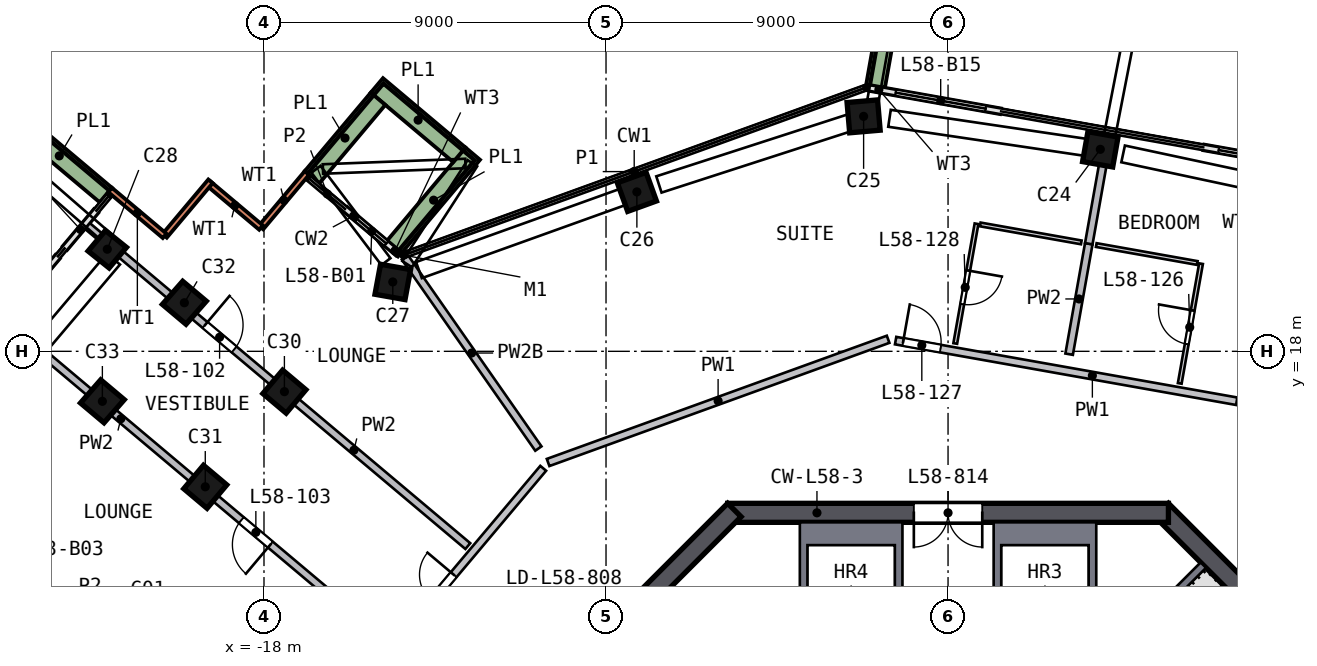
"""IFC4 building model, lengths in metres.
Left out: names, types, materials, properties, quantities, classifications, styles, units other than length and angle.
Written with IfcOpenShell. Run it as: python <this file> out.ifc"""

import sys

from ifc_helpers import new_model, si_unit, direction, frame, frame_2d, origin, origin_2d, place, context, subcontext, project, spatial, polyline, rectangle, outline, extrude, element, fill, save


model = new_model("IFC4")
c1 = context("Model", 3, precision=1e-05, world=origin(), true_north=direction((0.0, 1.0)))
c2 = subcontext(c1, "Body", "Model", "MODEL_VIEW")
j1 = project(units=[si_unit("LENGTHUNIT", "METRE"), si_unit("PLANEANGLEUNIT", "RADIAN")], contexts=[c1])
p1 = place(None, origin())
s1 = spatial("IfcSite", under=j1, at=p1, CompositionType="ELEMENT")
p2 = place(p1, origin())
s2 = spatial("IfcBuilding", under=s1, at=p2, CompositionType="ELEMENT")
p3 = place(p2, frame((0.0, 0.0, 237.5)))
s3 = spatial("IfcBuildingStorey", under=s2, at=p3, CompositionType="ELEMENT", Elevation=237.5)
p4 = place(p3, frame((4.141, 23.293, 0.0), z_axis=(-0.111029677, 0.018783788, 0.993639562), x_axis=(-0.978276827, 0.174054393, -0.112603368)))
e1 = element("IfcColumn", 1, at=p4, inside=s3, PredefinedType="COLUMN", context=c2, shape_type="SweptSolid", body=[
    extrude(rectangle(XDim=0.8, YDim=0.8, at=origin_2d()), origin(), (0.0, 0.0, 1.0), 3.21),
])
p5 = place(p3, frame((-2.083, 24.196, 0.0), z_axis=(-0.114946373, -0.010795228, 0.993313039), x_axis=(0.98971463, 0.084478949, 0.115448074)))
e2 = element("IfcColumn", 2, at=p5, inside=s3, PredefinedType="COLUMN", context=c2, shape_type="SweptSolid", body=[
    extrude(rectangle(XDim=0.8, YDim=0.8, at=origin_2d()), origin(), (0.0, 0.0, 1.0), 3.211),
])
p6 = place(p3, frame((-8.061, 22.243, 0.0), z_axis=(-0.105478981, -0.039240919, 0.993646987), x_axis=(-0.93419489, -0.338548583, -0.112537837)))
e3 = element("IfcColumn", 3, at=p6, inside=s3, PredefinedType="COLUMN", context=c2, shape_type="SweptSolid", body=[
    extrude(rectangle(XDim=0.8, YDim=0.8, at=origin_2d()), origin(), (0.0, 0.0, 1.0), 3.21),
])
p7 = place(p3, frame((-14.497, 19.91, 0.0), z_axis=(-0.094097867, -0.069699308, 0.993120133), x_axis=(0.980134973, -0.18142167, 0.080134963)))
e4 = element("IfcColumn", 4, at=p7, inside=s3, PredefinedType="COLUMN", context=c2, shape_type="SweptSolid", body=[
    extrude(rectangle(XDim=0.8, YDim=0.8, at=origin_2d()), origin(), (0.0, 0.0, 1.0), 3.212),
])
p8 = place(p3, frame((-21.863, 20.698, 0.0), z_axis=(-0.212105065, -0.008600875, 0.977209019), x_axis=(-0.619955277, -0.771799259, -0.141355432)))
e5 = element("IfcColumn", 5, at=p8, inside=s3, PredefinedType="COLUMN", context=c2, shape_type="SweptSolid", body=[
    extrude(rectangle(XDim=0.7, YDim=0.7, at=origin_2d()), origin(), (0.0, 0.0, 1.0), 3.264),
])
for number, where, z_axis, x_axis in (
    (6, (-17.366, 17.039, 0.0), (-0.08, -0.083, 0.993), (-0.765, 0.644, -0.008)),
    (7, (-19.463, 14.548, 0.0), (-0.068, -0.093, 0.993), (-0.766, 0.643, 0.008)),
):
    element("IfcColumn", number, at=place(p3, frame(where, z_axis=z_axis, x_axis=x_axis)), inside=s3, PredefinedType="COLUMN", context=c2, shape_type="SweptSolid", body=[
        extrude(rectangle(XDim=0.8, YDim=0.8, at=origin_2d()), origin(), (0.0, 0.0, 1.0), 3.211),
    ])
p9 = place(p3, frame((-19.843, 19.277, 0.0), z_axis=(-0.20588585, 0.000823843, 0.978575668), x_axis=(-0.742112726, 0.65170449, -0.156684267)))
e8 = element("IfcColumn", 8, at=p9, inside=s3, PredefinedType="COLUMN", context=c2, shape_type="SweptSolid", body=[
    extrude(rectangle(XDim=0.8, YDim=0.8, at=origin_2d()), origin(), (0.0, 0.0, 1.0), 3.26),
])
p10 = place(p3, frame((-22.015, 16.696, 0.0), z_axis=(-0.194071634, -0.009234356, 0.980943896), x_axis=(-0.745162414, 0.651744147, -0.141288865)))
e9 = element("IfcColumn", 9, at=p10, inside=s3, PredefinedType="COLUMN", context=c2, shape_type="SweptSolid", body=[
    extrude(rectangle(XDim=0.8, YDim=0.8, at=origin_2d()), origin(), (0.0, 0.0, 1.0), 3.252),
])
p11 = place(p3, frame((13.823, 5.622, 0.0), z_axis=(0.0, 0.0, 1.0), x_axis=(-0.707106781, 0.707106781, 0.0)))
e10 = element("IfcWall", 10, at=p11, inside=s3, PredefinedType="SHEAR", context=c2, shape_type="SweptSolid", body=[
    extrude(rectangle(XDim=11.598, YDim=0.5, at=frame_2d((5.799, 0.0))), origin(), (0.0, 0.0, 1.0), 3.5),
])
p12 = place(p11, frame((2.099, 0.0, 0.0)))
e11 = element("IfcOpeningElement", 11, at=p12, cuts=e10, PredefinedType="OPENING", context=c2, shape_type="SweptSolid", body=[
    extrude(rectangle(XDim=1.2, YDim=2.1, at=frame_2d((0.6, 1.05))), frame((0.0, 0.26, 0.0), z_axis=(0.0, -1.0, 0.0), x_axis=(1.0, 0.0, 0.0)), (0.0, 0.0, 1.0), 0.52),
])
p13 = place(p3, frame((5.799, 13.75, 0.0), z_axis=(0.0, 0.0, 1.0), x_axis=(-1.0, 0.0, 0.0)))
e12 = element("IfcWall", 12, at=p13, inside=s3, PredefinedType="SHEAR", context=c2, shape_type="SweptSolid", body=[
    extrude(rectangle(XDim=11.598, YDim=0.5, at=frame_2d((5.799, 0.0))), origin(), (0.0, 0.0, 1.0), 3.5),
])
p14 = place(p13, frame((4.899, 0.0, 0.0)))
e13 = element("IfcOpeningElement", 13, at=p14, cuts=e12, PredefinedType="OPENING", context=c2, shape_type="SweptSolid", body=[
    extrude(rectangle(XDim=1.8, YDim=2.1, at=frame_2d((0.9, 1.05))), frame((0.0, 0.26, 0.0), z_axis=(0.0, -1.0, 0.0), x_axis=(1.0, 0.0, 0.0)), (0.0, 0.0, 1.0), 0.52),
])
p15 = place(p3, frame((-5.622, 13.823, 0.0), z_axis=(0.0, 0.0, 1.0), x_axis=(-0.707106781, -0.707106781, 0.0)))
e14 = element("IfcWall", 14, at=p15, inside=s3, PredefinedType="SHEAR", context=c2, shape_type="SweptSolid", body=[
    extrude(rectangle(XDim=11.598, YDim=0.5, at=frame_2d((5.799, 0.0))), origin(), (0.0, 0.0, 1.0), 3.5),
])
p16 = place(p3, frame((-16.871, 22.692, 0.0), z_axis=(0.0, 0.0, 1.0), x_axis=(-0.64389112, -0.765117132, 0.0)))
e15 = element("IfcWall", 15, at=p16, inside=s3, PredefinedType="SOLIDWALL", context=c2, shape_type="SweptSolid", body=[
    extrude(rectangle(XDim=1.875, YDim=0.15, at=frame_2d((0.938, 0.0))), origin(), (0.0, 0.0, 1.0), 3.19),
])
p17 = place(p3, frame((-18.079, 21.258, 0.0), z_axis=(0.0, 0.0, 1.0), x_axis=(-0.765188969, 0.643805749, 0.0)))
e16 = element("IfcWall", 16, at=p17, inside=s3, PredefinedType="SOLIDWALL", context=c2, shape_type="SweptSolid", body=[
    extrude(rectangle(XDim=1.8, YDim=0.15, at=frame_2d((0.9, 0.0))), origin(), (0.0, 0.0, 1.0), 3.19),
])
p18 = place(p3, frame((-19.408, 22.474, 0.0), z_axis=(0.0, 0.0, 1.0), x_axis=(-0.643826975, -0.765171109, 0.0)))
e17 = element("IfcWall", 17, at=p18, inside=s3, PredefinedType="SOLIDWALL", context=c2, shape_type="SweptSolid", body=[
    extrude(rectangle(XDim=1.875, YDim=0.15, at=frame_2d((0.938, 0.0))), origin(), (0.0, 0.0, 1.0), 3.19),
])
p19 = place(p3, frame((-20.615, 21.039, 0.0), z_axis=(0.0, 0.0, 1.0), x_axis=(-0.765117132, 0.64389112, 0.0)))
e18 = element("IfcWall", 18, at=p19, inside=s3, PredefinedType="SOLIDWALL", context=c2, shape_type="SweptSolid", body=[
    extrude(rectangle(XDim=1.875, YDim=0.15, at=frame_2d((0.938, 0.0))), origin(), (0.0, 0.0, 1.0), 3.19),
])
p20 = place(p3, frame((-14.478, 20.58, 0.0), z_axis=(0.0, 0.0, 1.0), x_axis=(-0.765132746, 0.643872566, 0.0)))
e19 = element("IfcWall", 19, at=p20, inside=s3, PredefinedType="SOLIDWALL", context=c2, shape_type="SweptSolid", body=[
    extrude(rectangle(XDim=1.8, YDim=0.15, at=frame_2d((0.9, 0.0))), origin(), (0.0, 0.0, 1.0), 2.525),
])
p21 = place(p20, frame((0.4, 0.0, 0.0)))
e20 = element("IfcOpeningElement", 20, at=p21, cuts=e19, PredefinedType="OPENING", context=c2, shape_type="SweptSolid", body=[
    extrude(rectangle(XDim=1.0, YDim=2.4, at=frame_2d((0.5, 1.2))), frame((0.0, 0.085, 0.0), z_axis=(0.0, -1.0, 0.0), x_axis=(1.0, 0.0, 0.0)), (0.0, 0.0, 1.0), 0.17),
])
p22 = place(p3, frame((-23.431, 20.488, 0.0), z_axis=(0.0, 0.0, 1.0), x_axis=(-0.643838196, -0.765161667, 0.0)))
e21 = element("IfcWall", 21, at=p22, inside=s3, PredefinedType="SOLIDWALL", context=c2, shape_type="SweptSolid", body=[
    extrude(rectangle(XDim=3.26, YDim=0.15, at=frame_2d((1.63, 0.0))), origin(), (0.0, 0.0, 1.0), 2.525),
])
p23 = place(p22, frame((0.4, 0.0, 0.0)))
e22 = element("IfcOpeningElement", 22, at=p23, cuts=e21, PredefinedType="OPENING", context=c2, shape_type="SweptSolid", body=[
    extrude(rectangle(XDim=1.5, YDim=2.4, at=frame_2d((0.75, 1.2))), frame((0.0, 0.085, 0.0), z_axis=(0.0, -1.0, 0.0), x_axis=(1.0, 0.0, 0.0)), (0.0, 0.0, 1.0), 0.17),
])
p24 = place(p3, frame((-22.42, 21.689, 0.0), z_axis=(0.0, 0.0, 1.0), x_axis=(-0.643815345, -0.765180895, 0.0)))
e23 = element("IfcWall", 23, at=p24, inside=s3, PredefinedType="SOLIDWALL", context=c2, shape_type="SweptSolid", body=[
    extrude(rectangle(XDim=1.267, YDim=0.15, at=frame_2d((0.634, 0.0))), origin(), (0.0, 0.0, 1.0), 2.525),
])
p25 = place(p3, frame((10.534, 22.69, 0.0), z_axis=(0.0, 0.0, 1.0), x_axis=(-0.984569042, 0.174996577, 0.0)))
e24 = element("IfcWall", 24, at=p25, inside=s3, PredefinedType="SOLIDWALL", context=c2, shape_type="SweptSolid", body=[
    extrude(rectangle(XDim=3.863, YDim=0.15, at=frame_2d((1.932, 0.0))), origin(), (0.0, 0.0, 1.0), 2.525),
])
p26 = place(p25, frame((1.063, 0.0, 0.0)))
e25 = element("IfcOpeningElement", 25, at=p26, cuts=e24, PredefinedType="OPENING", context=c2, shape_type="SweptSolid", body=[
    extrude(rectangle(XDim=2.4, YDim=2.4, at=frame_2d((1.2, 1.2))), frame((0.0, 0.085, 0.0), z_axis=(0.0, -1.0, 0.0), x_axis=(1.0, 0.0, 0.0)), (0.0, 0.0, 1.0), 0.17),
])
p27 = place(p3, frame((1.382, 24.317, 0.0), z_axis=(0.0, 0.0, 1.0), x_axis=(-0.984564642, 0.175021328, 0.0)))
e26 = element("IfcWall", 26, at=p27, inside=s3, PredefinedType="SOLIDWALL", context=c2, shape_type="SweptSolid", body=[
    extrude(rectangle(XDim=3.504, YDim=0.15, at=frame_2d((1.752, 0.0))), origin(), (0.0, 0.0, 1.0), 2.525),
])
p28 = place(p27, frame((0.4, 0.0, 0.0)))
e27 = element("IfcOpeningElement", 27, at=p28, cuts=e26, PredefinedType="OPENING", context=c2, shape_type="SweptSolid", body=[
    extrude(rectangle(XDim=2.4, YDim=2.4, at=frame_2d((1.2, 1.2))), frame((0.0, 0.085, 0.0), z_axis=(0.0, -1.0, 0.0), x_axis=(1.0, 0.0, 0.0)), (0.0, 0.0, 1.0), 0.17),
])
p29 = place(p3, frame((-22.163, 22.113, 0.0), z_axis=(0.0, 0.0, 1.0), x_axis=(-0.765103138, 0.643907748, 0.0)))
e28 = element("IfcWall", 28, at=p29, inside=s3, PredefinedType="SOLIDWALL", context=c2, shape_type="SweptSolid", body=[
    extrude(rectangle(XDim=3.199, YDim=0.5, at=frame_2d((1.6, 0.0))), origin(), (0.0, 0.0, 1.0), 0.7),
])
p30 = place(p3, frame((11.874, 25.524, 0.0), z_axis=(0.0, 0.0, 1.0), x_axis=(-0.984565369, 0.175017239, 0.0)))
e29 = element("IfcWall", 29, at=p30, inside=s3, PredefinedType="SOLIDWALL", context=c2, shape_type="SweptSolid", body=[
    extrude(rectangle(XDim=13.724, YDim=0.5, at=frame_2d((6.862, 0.0))), origin(), (0.0, 0.0, 1.0), 0.7),
])
p31 = place(p3, frame((-1.435, 27.636, 0.0), z_axis=(0.0, 0.0, 1.0), x_axis=(-0.174951491, -0.984577054, 0.0)))
e30 = element("IfcWall", 30, at=p31, inside=s3, PredefinedType="SOLIDWALL", context=c2, shape_type="SweptSolid", body=[
    extrude(rectangle(XDim=2.699, YDim=0.5, at=frame_2d((1.349, 0.0))), origin(), (0.0, 0.0, 1.0), 0.7),
])
p32 = place(p3, frame((-14.567, 20.754, 0.0), z_axis=(0.0, 0.0, 1.0), x_axis=(0.643863069, 0.765140738, 0.0)))
e31 = element("IfcWall", 31, at=p32, inside=s3, PredefinedType="SOLIDWALL", context=c2, shape_type="SweptSolid", body=[
    extrude(rectangle(XDim=3.199, YDim=0.5, at=frame_2d((1.599, 0.0))), origin(), (0.0, 0.0, 1.0), 0.7),
])
p33 = place(p3, frame((-12.859, 23.171, 0.0), z_axis=(0.0, 0.0, 1.0), x_axis=(-0.765143293, 0.643860033, 0.0)))
e32 = element("IfcWall", 32, at=p33, inside=s3, PredefinedType="SOLIDWALL", context=c2, shape_type="SweptSolid", body=[
    extrude(rectangle(XDim=2.836, YDim=0.5, at=frame_2d((1.418, 0.0))), origin(), (0.0, 0.0, 1.0), 0.7),
])
p34 = place(p3, frame((-14.999, 24.645, 0.0), z_axis=(0.0, 0.0, 1.0), x_axis=(-0.643896148, -0.7651129, 0.0)))
e33 = element("IfcWall", 33, at=p34, inside=s3, PredefinedType="SOLIDWALL", context=c2, shape_type="SweptSolid", body=[
    extrude(rectangle(XDim=2.699, YDim=0.5, at=frame_2d((1.35, 0.0))), origin(), (0.0, 0.0, 1.0), 0.7),
])
p35 = place(p3, origin())
e34 = element("IfcWall", 34, at=p35, inside=s3, PredefinedType="SOLIDWALL", context=c2, shape_type="SweptSolid", body=[
    extrude(outline(polyline([(3.9, 9.9), (3.7, 9.9), (3.7, 12.9), (1.4, 12.9), (1.4, 9.9), (1.2, 9.9), (1.2, 13.5), (3.9, 13.5), (3.9, 9.9)])), origin(), (0.0, 0.0, 1.0), 3.19),
])
p36 = place(p3, origin())
e35 = element("IfcWall", 35, at=p36, inside=s3, PredefinedType="SOLIDWALL", context=c2, shape_type="SweptSolid", body=[
    extrude(outline(polyline([(-3.9, 13.5), (-1.2, 13.5), (-1.2, 9.9), (-1.4, 9.9), (-1.4, 12.9), (-3.7, 12.9), (-3.7, 9.9), (-3.9, 9.9), (-3.9, 13.5)])), origin(), (0.0, 0.0, 1.0), 3.19),
])
p37 = place(p3, frame((3.677, 9.334, 0.0), z_axis=(0.0, 0.0, 1.0), x_axis=(0.707078393, 0.707135168, 0.0)))
e36 = element("IfcWall", 36, at=p37, inside=s3, PredefinedType="SOLIDWALL", context=c2, shape_type="SweptSolid", body=[
    extrude(rectangle(XDim=4.3, YDim=0.2, at=frame_2d((2.15, 0.0))), origin(), (0.0, 0.0, 1.0), 3.19),
])
p38 = place(p3, frame((-16.651, 7.793, 0.0), z_axis=(0.0, 0.0, 1.0), x_axis=(0.64385004, 0.765151702, 0.0)))
e37 = element("IfcWall", 37, at=p38, inside=s3, PredefinedType="SOLIDWALL", context=c2, shape_type="SweptSolid", body=[
    extrude(rectangle(XDim=9.317, YDim=0.2, at=frame_2d((4.658, 0.0))), origin(), (0.0, 0.0, 1.0), 3.19),
])
p39 = place(p38, frame((3.858, 0.0, 0.0)))
e38 = element("IfcOpeningElement", 38, at=p39, cuts=e37, PredefinedType="OPENING", context=c2, shape_type="SweptSolid", body=[
    extrude(rectangle(XDim=1.8, YDim=2.1, at=frame_2d((0.9, 1.05))), frame((0.0, 0.11, 0.0), z_axis=(0.0, -1.0, 0.0), x_axis=(1.0, 0.0, 0.0)), (0.0, 0.0, 1.0), 0.22),
])
p40 = place(p3, frame((-1.577, 18.317, 0.0), z_axis=(0.0, 0.0, 1.0), x_axis=(-0.940167401, -0.340712869, 0.0)))
e39 = element("IfcWall", 39, at=p40, inside=s3, PredefinedType="SOLIDWALL", context=c2, shape_type="SweptSolid", body=[
    extrude(rectangle(XDim=9.516, YDim=0.2, at=frame_2d((4.758, 0.0))), origin(), (0.0, 0.0, 1.0), 3.19),
])
p41 = place(p3, frame((-1.379, 18.282, 0.0), z_axis=(0.0, 0.0, 1.0), x_axis=(0.984561687, -0.17503795, 0.0)))
e40 = element("IfcWall", 40, at=p41, inside=s3, PredefinedType="SOLIDWALL", context=c2, shape_type="SweptSolid", body=[
    extrude(rectangle(XDim=9.116, YDim=0.2, at=frame_2d((4.558, 0.0))), origin(), (0.0, 0.0, 1.0), 3.19),
])
p42 = place(p41, frame((0.2, 0.0, 0.0)))
e41 = element("IfcOpeningElement", 41, at=p42, cuts=e40, PredefinedType="OPENING", context=c2, shape_type="SweptSolid", body=[
    extrude(rectangle(XDim=1.0, YDim=2.1, at=frame_2d((0.5, 1.05))), frame((0.0, 0.11, 0.0), z_axis=(0.0, -1.0, 0.0), x_axis=(1.0, 0.0, 0.0)), (0.0, 0.0, 1.0), 0.22),
])
p43 = place(p3, frame((-14.771, 10.338, 0.0), z_axis=(0.0, 0.0, 1.0), x_axis=(-0.765135633, 0.643869135, 0.0)))
e42 = element("IfcWall", 42, at=p43, inside=s3, PredefinedType="SOLIDWALL", context=c2, shape_type="SweptSolid", body=[
    extrude(rectangle(XDim=13.086, YDim=0.2, at=frame_2d((6.543, 0.0))), origin(), (0.0, 0.0, 1.0), 3.19),
])
p44 = place(p43, frame((4.0, 0.0, 0.0)))
e43 = element("IfcOpeningElement", 43, at=p44, cuts=e42, PredefinedType="OPENING", context=c2, shape_type="SweptSolid", body=[
    extrude(rectangle(XDim=1.0, YDim=2.1, at=frame_2d((0.5, 1.05))), frame((0.0, 0.11, 0.0), z_axis=(0.0, -1.0, 0.0), x_axis=(1.0, 0.0, 0.0)), (0.0, 0.0, 1.0), 0.22),
])
p45 = place(p3, frame((-22.65, 21.3, 0.0), z_axis=(0.0, 0.0, 1.0), x_axis=(0.765152558, -0.643849022, 0.0)))
e44 = element("IfcWall", 44, at=p45, inside=s3, PredefinedType="SOLIDWALL", context=c2, shape_type="SweptSolid", body=[
    extrude(rectangle(XDim=13.086, YDim=0.2, at=frame_2d((6.543, 0.0))), origin(), (0.0, 0.0, 1.0), 3.19),
])
p46 = place(p45, frame((4.05, 0.0, 0.0)))
e45 = element("IfcOpeningElement", 45, at=p46, cuts=e44, PredefinedType="OPENING", context=c2, shape_type="SweptSolid", body=[
    extrude(rectangle(XDim=1.0, YDim=2.1, at=frame_2d((0.5, 1.05))), frame((0.0, 0.11, 0.0), z_axis=(0.0, -1.0, 0.0), x_axis=(1.0, 0.0, 0.0)), (0.0, 0.0, 1.0), 0.22),
])
p47 = place(p3, frame((-14.29, 20.469, 0.0), z_axis=(0.0, 0.0, 1.0), x_axis=(0.572451851, -0.819938338, 0.0)))
e46 = element("IfcWall", 46, at=p47, inside=s3, PredefinedType="SOLIDWALL", context=c2, shape_type="SweptSolid", body=[
    extrude(rectangle(XDim=6.132, YDim=0.2, at=frame_2d((3.066, 0.0))), origin(), (0.0, 0.0, 1.0), 2.69),
])
p48 = place(p3, frame((3.186, 17.925, 0.0), z_axis=(0.0, 0.0, 1.0), x_axis=(0.175035116, 0.984562191, 0.0)))
e47 = element("IfcWall", 47, at=p48, inside=s3, PredefinedType="SOLIDWALL", context=c2, shape_type="SweptSolid", body=[
    extrude(rectangle(XDim=2.953, YDim=0.2, at=frame_2d((1.477, 0.0))), origin(), (0.0, 0.0, 1.0), 3.19),
])
p49 = place(p3, frame((3.703, 20.832, 0.0), z_axis=(0.0, 0.0, 1.0), x_axis=(0.175045815, 0.984560289, 0.0)))
e48 = element("IfcWall", 48, at=p49, inside=s3, PredefinedType="SOLIDWALL", context=c2, shape_type="SweptSolid", body=[
    extrude(rectangle(XDim=2.95, YDim=0.2, at=frame_2d((1.475, 0.0))), origin(), (0.0, 0.0, 1.0), 3.19),
])
p50 = place(p3, frame((0.75, 21.357, 0.0), z_axis=(0.0, 0.0, 1.0), x_axis=(-0.175030048, -0.984563092, 0.0)))
e49 = element("IfcWall", 49, at=p50, inside=s3, PredefinedType="PARTITIONING", context=c2, shape_type="SweptSolid", body=[
    extrude(rectangle(XDim=3.2, YDim=0.1, at=frame_2d((1.6, 0.0))), origin(), (0.0, 0.0, 1.0), 3.19),
])
p51 = place(p50, frame((1.25, 0.0, 0.0)))
e50 = element("IfcOpeningElement", 50, at=p51, cuts=e49, PredefinedType="OPENING", context=c2, shape_type="SweptSolid", body=[
    extrude(rectangle(XDim=0.9, YDim=2.1, at=frame_2d((0.45, 1.05))), frame((0.0, 0.06, 0.0), z_axis=(0.0, -1.0, 0.0), x_axis=(1.0, 0.0, 0.0)), (0.0, 0.0, 1.0), 0.12),
])
p52 = place(p3, frame((0.848, 21.339, 0.0), z_axis=(0.0, 0.0, 1.0), x_axis=(0.984559738, -0.175048917, 0.0)))
e51 = element("IfcWall", 51, at=p52, inside=s3, PredefinedType="PARTITIONING", context=c2, shape_type="SweptSolid", body=[
    extrude(rectangle(XDim=2.7, YDim=0.1, at=frame_2d((1.35, 0.0))), origin(), (0.0, 0.0, 1.0), 3.19),
])
p53 = place(p3, frame((6.558, 20.324, 0.0), z_axis=(0.0, 0.0, 1.0), x_axis=(-0.984572549, 0.174976844, 0.0)))
e52 = element("IfcWall", 52, at=p53, inside=s3, PredefinedType="PARTITIONING", context=c2, shape_type="SweptSolid", body=[
    extrude(rectangle(XDim=2.7, YDim=0.1, at=frame_2d((1.35, 0.0))), origin(), (0.0, 0.0, 1.0), 3.19),
])
p54 = place(p3, frame((6.097, 17.156, 0.0), z_axis=(0.0, 0.0, 1.0), x_axis=(0.175090855, 0.98455228, 0.0)))
e53 = element("IfcWall", 53, at=p54, inside=s3, PredefinedType="PARTITIONING", context=c2, shape_type="SweptSolid", body=[
    extrude(rectangle(XDim=3.2, YDim=0.1, at=frame_2d((1.6, 0.0))), origin(), (0.0, 0.0, 1.0), 3.19),
])
p55 = place(p54, frame((1.05, 0.0, 0.0)))
e54 = element("IfcOpeningElement", 54, at=p55, cuts=e53, PredefinedType="OPENING", context=c2, shape_type="SweptSolid", body=[
    extrude(rectangle(XDim=0.9, YDim=2.1, at=frame_2d((0.45, 1.05))), frame((0.0, 0.06, 0.0), z_axis=(0.0, -1.0, 0.0), x_axis=(1.0, 0.0, 0.0)), (0.0, 0.0, 1.0), 0.12),
])
p56 = place(p21, origin())
e55 = element("IfcDoor", 55, at=p56, inside=s3, OperationType="SLIDING_TO_LEFT", PredefinedType="DOOR", context=c2, shape_type="SweptSolid", body=[
    extrude(rectangle(XDim=1.0, YDim=2.4, at=frame_2d((0.5, 1.2))), frame((0.0, 0.025, 0.0), z_axis=(0.0, -1.0, 0.0), x_axis=(1.0, 0.0, 0.0)), (0.0, 0.0, 1.0), 0.05),
])
fill(e20, e55)
p57 = place(p26, origin())
e56 = element("IfcDoor", 56, at=p57, inside=s3, OperationType="SLIDING_TO_LEFT", PredefinedType="DOOR", context=c2, shape_type="SweptSolid", body=[
    extrude(rectangle(XDim=2.4, YDim=2.4, at=frame_2d((1.2, 1.2))), frame((0.0, 0.025, 0.0), z_axis=(0.0, -1.0, 0.0), x_axis=(1.0, 0.0, 0.0)), (0.0, 0.0, 1.0), 0.05),
])
fill(e25, e56)
p58 = place(p28, origin())
e57 = element("IfcDoor", 57, at=p58, inside=s3, OperationType="SLIDING_TO_RIGHT", PredefinedType="DOOR", context=c2, shape_type="SweptSolid", body=[
    extrude(rectangle(XDim=2.4, YDim=2.4, at=frame_2d((1.2, 1.2))), frame((0.0, 0.025, 0.0), z_axis=(0.0, -1.0, 0.0), x_axis=(1.0, 0.0, 0.0)), (0.0, 0.0, 1.0), 0.05),
])
fill(e27, e57)
p59 = place(p14, origin())
e58 = element("IfcDoor", 58, at=p59, inside=s3, OperationType="DOUBLE_DOOR_SINGLE_SWING", PredefinedType="DOOR", context=c2, shape_type="SweptSolid", body=[
    extrude(rectangle(XDim=1.8, YDim=2.1, at=frame_2d((0.9, 1.05))), frame((0.0, 0.025, 0.0), z_axis=(0.0, -1.0, 0.0), x_axis=(1.0, 0.0, 0.0)), (0.0, 0.0, 1.0), 0.05),
])
fill(e13, e58)
p60 = place(p39, origin())
e59 = element("IfcDoor", 59, at=p60, inside=s3, OperationType="DOUBLE_DOOR_SINGLE_SWING", PredefinedType="DOOR", context=c2, shape_type="SweptSolid", body=[
    extrude(rectangle(XDim=1.8, YDim=2.1, at=frame_2d((0.9, 1.05))), frame((0.0, 0.025, 0.0), z_axis=(0.0, -1.0, 0.0), x_axis=(1.0, 0.0, 0.0)), (0.0, 0.0, 1.0), 0.05),
])
fill(e38, e59)
p61 = place(p46, origin())
e60 = element("IfcDoor", 60, at=p61, inside=s3, OperationType="SINGLE_SWING_LEFT", PredefinedType="DOOR", context=c2, shape_type="SweptSolid", body=[
    extrude(rectangle(XDim=1.0, YDim=2.1, at=frame_2d((0.5, 1.05))), frame((0.0, 0.025, 0.0), z_axis=(0.0, -1.0, 0.0), x_axis=(1.0, 0.0, 0.0)), (0.0, 0.0, 1.0), 0.05),
])
fill(e45, e60)
p62 = place(p44, origin())
e61 = element("IfcDoor", 61, at=p62, inside=s3, OperationType="SINGLE_SWING_LEFT", PredefinedType="DOOR", context=c2, shape_type="SweptSolid", body=[
    extrude(rectangle(XDim=1.0, YDim=2.1, at=frame_2d((0.5, 1.05))), frame((0.0, 0.025, 0.0), z_axis=(0.0, -1.0, 0.0), x_axis=(1.0, 0.0, 0.0)), (0.0, 0.0, 1.0), 0.05),
])
fill(e43, e61)
p63 = place(p55, origin())
e62 = element("IfcDoor", 62, at=p63, inside=s3, OperationType="SINGLE_SWING_RIGHT", PredefinedType="DOOR", context=c2, shape_type="SweptSolid", body=[
    extrude(rectangle(XDim=0.9, YDim=2.1, at=frame_2d((0.45, 1.05))), frame((0.0, 0.025, 0.0), z_axis=(0.0, -1.0, 0.0), x_axis=(1.0, 0.0, 0.0)), (0.0, 0.0, 1.0), 0.05),
])
fill(e54, e62)
p64 = place(p42, origin())
e63 = element("IfcDoor", 63, at=p64, inside=s3, OperationType="SINGLE_SWING_LEFT", PredefinedType="DOOR", context=c2, shape_type="SweptSolid", body=[
    extrude(rectangle(XDim=1.0, YDim=2.1, at=frame_2d((0.5, 1.05))), frame((0.0, 0.025, 0.0), z_axis=(0.0, -1.0, 0.0), x_axis=(1.0, 0.0, 0.0)), (0.0, 0.0, 1.0), 0.05),
])
fill(e41, e63)
p65 = place(p51, origin())
e64 = element("IfcDoor", 64, at=p65, inside=s3, OperationType="SINGLE_SWING_LEFT", PredefinedType="DOOR", context=c2, shape_type="SweptSolid", body=[
    extrude(rectangle(XDim=0.9, YDim=2.1, at=frame_2d((0.45, 1.05))), frame((0.0, 0.025, 0.0), z_axis=(0.0, -1.0, 0.0), x_axis=(1.0, 0.0, 0.0)), (0.0, 0.0, 1.0), 0.05),
])
fill(e50, e64)
save(model, sys.argv[1])
